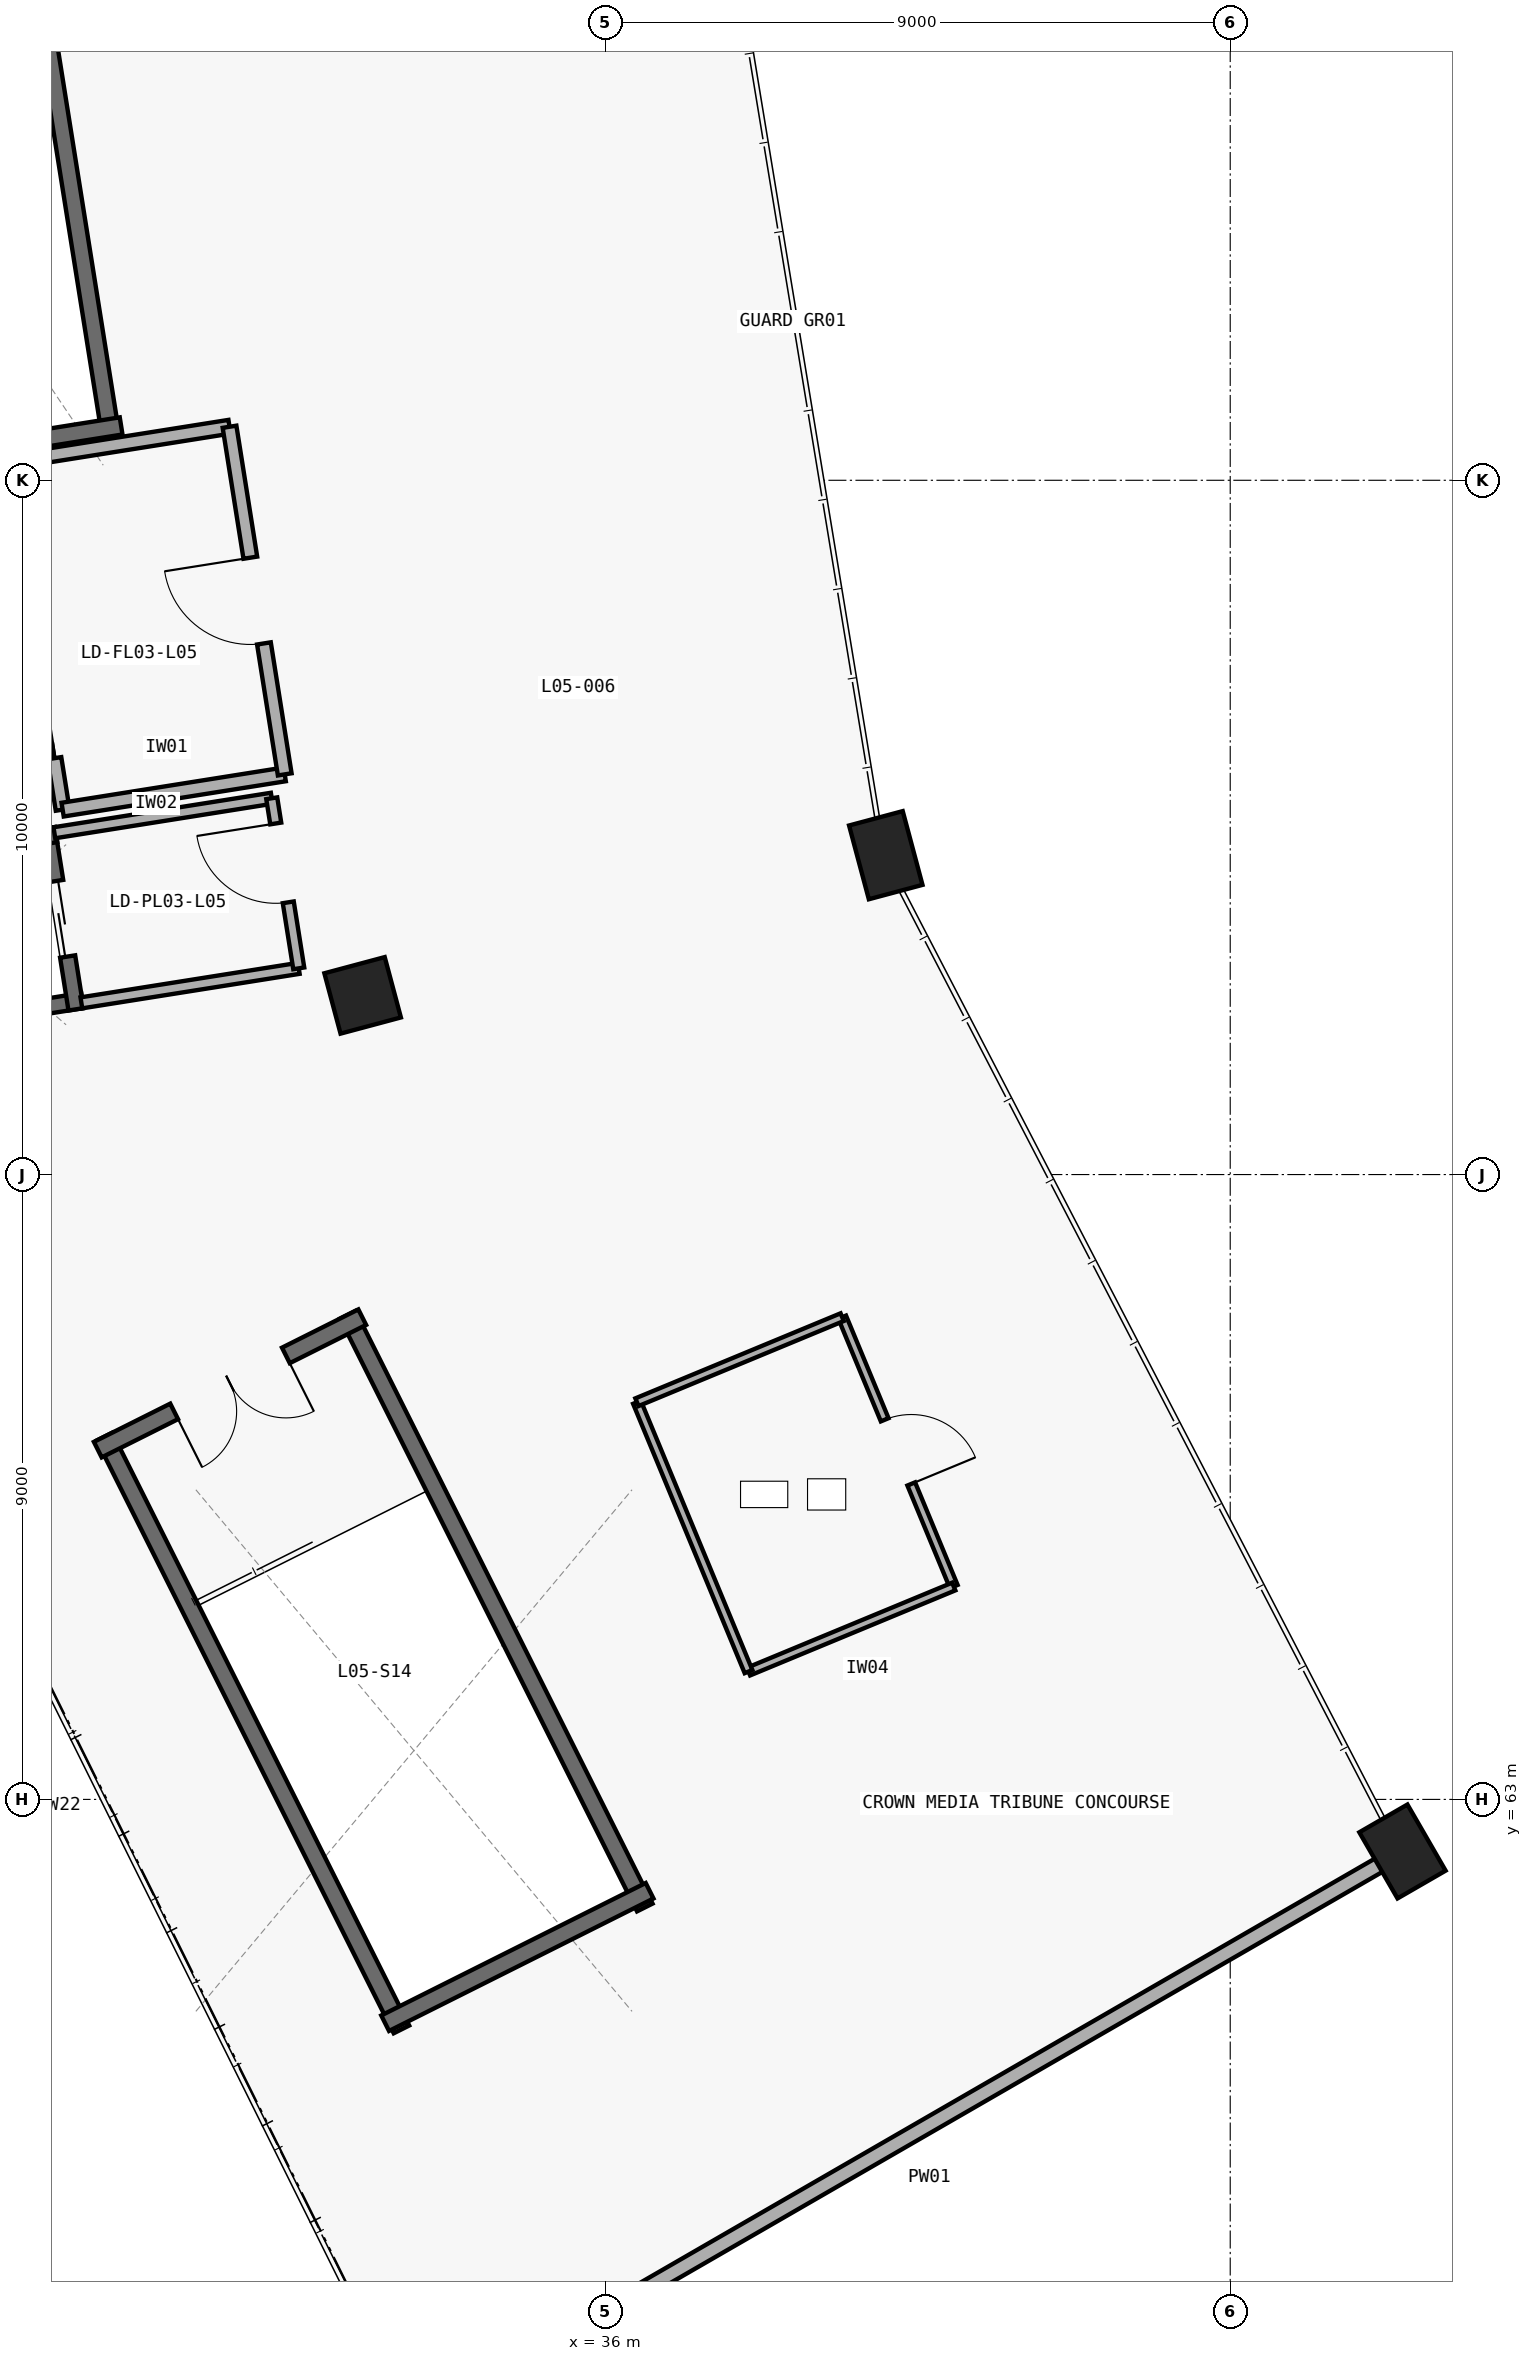
"""IFC4 building model, lengths in metres.
Left out: names, types, materials, properties, quantities, classifications, styles, units other than length and angle.
Written with IfcOpenShell. Run it as: python <this file> out.ifc"""

import sys

from ifc_helpers import new_model, si_unit, direction, frame, frame_2d, origin, origin_2d, place, context, subcontext, project, spatial, rectangle, extrude, element, fill, save


model = new_model("IFC4")
c1 = context("Model", 3, precision=1e-05, world=origin(), true_north=direction((0.0, 1.0)))
c2 = subcontext(c1, "Body", "Model", "MODEL_VIEW")
j1 = project(units=[si_unit("LENGTHUNIT", "METRE"), si_unit("PLANEANGLEUNIT", "RADIAN")], contexts=[c1])
p1 = place(None, origin())
s1 = spatial("IfcSite", under=j1, at=p1, CompositionType="ELEMENT")
p2 = place(p1, origin())
s2 = spatial("IfcBuilding", under=s1, at=p2, CompositionType="ELEMENT")
p3 = place(p2, frame((0.0, 0.0, 24.6)))
s3 = spatial("IfcBuildingStorey", under=s2, at=p3, CompositionType="ELEMENT", Elevation=24.6)
p4 = place(p3, frame((40.039, 76.6, 0.0), z_axis=(0.0, 0.0, 1.0), x_axis=(0.965925826289, 0.258819045103, 0.0)))
e1 = element("IfcColumn", 1, at=p4, inside=s3, PredefinedType="COLUMN", context=c2, shape_type="SweptSolid", body=[
    extrude(rectangle(XDim=0.8, YDim=1.1, at=origin_2d()), origin(), (0.0, 0.0, 1.0), 4.8),
])
p5 = place(p3, frame((32.504, 74.581, 0.0), z_axis=(0.0, 0.0, 1.0), x_axis=(0.965925826289, 0.258819045103, 0.0)))
e2 = element("IfcColumn", 2, at=p5, inside=s3, PredefinedType="COLUMN", context=c2, shape_type="SweptSolid", body=[
    extrude(rectangle(XDim=0.9, YDim=0.9, at=origin_2d()), origin(), (0.0, 0.0, 1.0), 4.8),
])
p6 = place(p3, frame((47.481, 62.25, 0.0), z_axis=(0.0, 0.0, 1.0), x_axis=(0.866025403784, 0.5, 0.0)))
e3 = element("IfcColumn", 3, at=p6, inside=s3, PredefinedType="COLUMN", context=c2, shape_type="SweptSolid", body=[
    extrude(rectangle(XDim=0.8, YDim=1.1, at=origin_2d()), origin(), (0.0, 0.0, 1.0), 4.8),
])
p7 = place(p3, frame((47.481, 62.25, 0.0), z_axis=(0.0, 0.0, 1.0), x_axis=(-0.866019999656, -0.500009360108, 0.0)))
e4 = element("IfcWall", 4, at=p7, inside=s3, PredefinedType="PARAPET", context=c2, shape_type="SweptSolid", body=[
    extrude(rectangle(XDim=16.5, YDim=0.22, at=frame_2d((8.25, 0.0))), origin(), (0.0, 0.0, 1.0), 3.89),
])
p8 = place(p3, frame((28.887, 82.573, 0.0), z_axis=(0.0, 0.0, 1.0), x_axis=(-0.157243678356, 0.987559833943, 0.0)))
e5 = element("IfcWall", 5, at=p8, inside=s3, PredefinedType="SHEAR", context=c2, shape_type="SweptSolid", body=[
    extrude(rectangle(XDim=9.55, YDim=0.25, at=frame_2d((4.775, 0.0))), origin(), (0.0, 0.0, 1.0), 4.62),
])
p9 = place(p3, frame((24.819, 82.113, 0.0), z_axis=(0.0, 0.0, 1.0), x_axis=(0.987557660991, 0.157257324847, 0.0)))
e6 = element("IfcWall", 6, at=p9, inside=s3, PredefinedType="SHEAR", context=c2, shape_type="SweptSolid", body=[
    extrude(rectangle(XDim=4.26, YDim=0.25, at=frame_2d((2.13, 0.0))), origin(), (0.0, 0.0, 1.0), 4.62),
])
for number, where, z_axis, x_axis in (
    (7, (28.785, 68.226, 0.0), (0.0, 0.0, 1.0), (0.448, -0.894, 0.0)),
    (8, (36.568, 61.443, 0.0), (0.0, 0.0, 1.0), (-0.448, 0.894, 0.0)),
):
    element("IfcWall", number, at=place(p3, frame(where, z_axis=z_axis, x_axis=x_axis)), inside=s3, PredefinedType="SHEAR", context=c2, shape_type="SweptSolid", body=[
        extrude(rectangle(XDim=9.55, YDim=0.25, at=frame_2d((4.775, 0.0))), origin(), (0.0, 0.0, 1.0), 4.62),
    ])
p10 = place(p3, frame((32.498, 69.946, 0.0), z_axis=(0.0, 0.0, 1.0), x_axis=(-0.89409454548, -0.447878268888, 0.0)))
e9 = element("IfcWall", 9, at=p10, inside=s3, PredefinedType="SHEAR", context=c2, shape_type="SweptSolid", body=[
    extrude(rectangle(XDim=4.26, YDim=0.25, at=frame_2d((2.13, 0.0))), origin(), (0.0, 0.0, 1.0), 4.62),
])
p11 = place(p10, frame((1.23, 0.0, 0.0)))
e10 = element("IfcOpeningElement", 10, at=p11, cuts=e9, PredefinedType="OPENING", context=c2, shape_type="SweptSolid", body=[
    extrude(rectangle(XDim=1.8, YDim=2.25, at=frame_2d((0.9, 1.125))), frame((0.0, 0.135, 0.0), z_axis=(0.0, -1.0, 0.0), x_axis=(1.0, 0.0, 0.0)), (0.0, 0.0, 1.0), 0.27),
])
p12 = place(p3, frame((32.828, 59.777, 0.0), z_axis=(0.0, 0.0, 1.0), x_axis=(0.89409454548, 0.447878268888, 0.0)))
e11 = element("IfcWall", 11, at=p12, inside=s3, PredefinedType="SHEAR", context=c2, shape_type="SweptSolid", body=[
    extrude(rectangle(XDim=4.26, YDim=0.25, at=frame_2d((2.13, 0.0))), origin(), (0.0, 0.0, 1.0), 4.62),
])
p13 = place(p3, frame((24.653, 77.547, 0.0), z_axis=(0.0, 0.0, 1.0), x_axis=(0.987703627881, 0.156337914372, 0.0)))
e12 = element("IfcWall", 12, at=p13, inside=s3, PredefinedType="SHEAR", context=c2, shape_type="SweptSolid", body=[
    extrude(rectangle(XDim=3.44, YDim=0.22, at=frame_2d((1.72, 0.0))), origin(), (0.0, 0.0, 1.0), 4.62),
])
p14 = place(p3, frame((27.959, 77.959, 0.0), z_axis=(0.0, 0.0, 1.0), x_axis=(-0.156807626334, 0.987629165387, 0.0)))
e13 = element("IfcWall", 13, at=p14, inside=s3, PredefinedType="SHEAR", context=c2, shape_type="SweptSolid", body=[
    extrude(rectangle(XDim=2.641, YDim=0.22, at=frame_2d((1.32, 0.0))), origin(), (0.0, 0.0, 1.0), 4.62),
])
p15 = place(p14, frame((0.62, 0.0, 0.0)))
e14 = element("IfcOpeningElement", 14, at=p15, cuts=e13, PredefinedType="OPENING", context=c2, shape_type="SweptSolid", body=[
    extrude(rectangle(XDim=1.4, YDim=2.2, at=frame_2d((0.7, 1.1))), frame((0.0, 0.12, 0.0), z_axis=(0.0, -1.0, 0.0), x_axis=(1.0, 0.0, 0.0)), (0.0, 0.0, 1.0), 0.24),
])
p16 = place(p3, frame((28.183, 77.256, 0.0), z_axis=(0.0, 0.0, 1.0), x_axis=(-0.157482870509, 0.987521719, 0.0)))
e15 = element("IfcWall", 15, at=p16, inside=s3, PredefinedType="PARTITIONING", context=c2, shape_type="SweptSolid", body=[
    extrude(rectangle(XDim=0.75, YDim=0.2, at=frame_2d((0.375, 0.0))), origin(), (0.0, 0.0, 1.0), 4.6),
])
p17 = place(p3, frame((28.183, 77.256, 0.0), z_axis=(0.0, 0.0, 1.0), x_axis=(0.987633675984, 0.156779214382, 0.0)))
e16 = element("IfcWall", 16, at=p17, inside=s3, PredefinedType="PARTITIONING", context=c2, shape_type="SweptSolid", body=[
    extrude(rectangle(XDim=3.239, YDim=0.2, at=frame_2d((1.62, 0.0))), origin(), (0.0, 0.0, 1.0), 4.6),
])
p18 = place(p3, frame((27.387, 82.263, 0.0), z_axis=(0.0, 0.0, 1.0), x_axis=(0.987629416648, 0.156806043797, 0.0)))
e17 = element("IfcWall", 17, at=p18, inside=s3, PredefinedType="PARTITIONING", context=c2, shape_type="SweptSolid", body=[
    extrude(rectangle(XDim=3.24, YDim=0.2, at=frame_2d((1.62, 0.0))), origin(), (0.0, 0.0, 1.0), 4.6),
])
p19 = place(p3, frame((31.382, 77.764, 0.0), z_axis=(0.0, 0.0, 1.0), x_axis=(-0.156842848291, 0.987623572491, 0.0)))
e18 = element("IfcWall", 18, at=p19, inside=s3, PredefinedType="PARTITIONING", context=c2, shape_type="SweptSolid", body=[
    extrude(rectangle(XDim=5.07, YDim=0.2, at=frame_2d((2.535, 0.0))), origin(), (0.0, 0.0, 1.0), 4.6),
])
p20 = place(p19, frame((1.91, 0.0, 0.0)))
e19 = element("IfcOpeningElement", 19, at=p20, cuts=e18, PredefinedType="OPENING", context=c2, shape_type="SweptSolid", body=[
    extrude(rectangle(XDim=1.25, YDim=2.2, at=frame_2d((0.625, 1.1))), frame((0.0, 0.11, 0.0), z_axis=(0.0, -1.0, 0.0), x_axis=(1.0, 0.0, 0.0)), (0.0, 0.0, 1.0), 0.22),
])
p21 = place(p3, frame((25.366, 74.014, 0.0), z_axis=(0.0, 0.0, 1.0), x_axis=(0.987645460109, 0.156704962032, 0.0)))
e20 = element("IfcWall", 20, at=p21, inside=s3, PredefinedType="SHEAR", context=c2, shape_type="SweptSolid", body=[
    extrude(rectangle(XDim=3.141, YDim=0.22, at=frame_2d((1.57, 0.0))), origin(), (0.0, 0.0, 1.0), 4.62),
])
p22 = place(p3, frame((28.376, 74.38, 0.0), z_axis=(0.0, 0.0, 1.0), x_axis=(-0.156793308963, 0.987631438475, 0.0)))
e21 = element("IfcWall", 21, at=p22, inside=s3, PredefinedType="SHEAR", context=c2, shape_type="SweptSolid", body=[
    extrude(rectangle(XDim=2.641, YDim=0.22, at=frame_2d((1.32, 0.0))), origin(), (0.0, 0.0, 1.0), 4.62),
])
p23 = place(p22, frame((0.77, 0.0, 0.0)))
e22 = element("IfcOpeningElement", 22, at=p23, cuts=e21, PredefinedType="OPENING", context=c2, shape_type="SweptSolid", body=[
    extrude(rectangle(XDim=1.1, YDim=2.15, at=frame_2d((0.55, 1.075))), frame((0.0, 0.12, 0.0), z_axis=(0.0, -1.0, 0.0), x_axis=(1.0, 0.0, 0.0)), (0.0, 0.0, 1.0), 0.24),
])
p24 = place(p3, frame((28.088, 76.896, 0.0), z_axis=(0.0, 0.0, 1.0), x_axis=(-0.98765558045, -0.156641164471, 0.0)))
e23 = element("IfcWall", 23, at=p24, inside=s3, PredefinedType="SHEAR", context=c2, shape_type="SweptSolid", body=[
    extrude(rectangle(XDim=3.141, YDim=0.22, at=frame_2d((1.57, 0.0))), origin(), (0.0, 0.0, 1.0), 4.62),
])
p25 = place(p3, frame((28.453, 74.473, 0.0), z_axis=(0.0, 0.0, 1.0), x_axis=(0.987632121619, 0.156789005818, 0.0)))
e24 = element("IfcWall", 24, at=p25, inside=s3, PredefinedType="PARTITIONING", context=c2, shape_type="SweptSolid", body=[
    extrude(rectangle(XDim=3.17, YDim=0.16, at=frame_2d((1.585, 0.0))), origin(), (0.0, 0.0, 1.0), 4.6),
])
p26 = place(p3, frame((28.064, 76.923, 0.0), z_axis=(0.0, 0.0, 1.0), x_axis=(0.987644043639, 0.156713889186, 0.0)))
e25 = element("IfcWall", 25, at=p26, inside=s3, PredefinedType="PARTITIONING", context=c2, shape_type="SweptSolid", body=[
    extrude(rectangle(XDim=3.17, YDim=0.16, at=frame_2d((1.585, 0.0))), origin(), (0.0, 0.0, 1.0), 4.6),
])
p27 = place(p3, frame((31.584, 74.97, 0.0), z_axis=(0.0, 0.0, 1.0), x_axis=(-0.156781258489, 0.987633351496, 0.0)))
e26 = element("IfcWall", 26, at=p27, inside=s3, PredefinedType="PARTITIONING", context=c2, shape_type="SweptSolid", body=[
    extrude(rectangle(XDim=2.481, YDim=0.16, at=frame_2d((1.24, 0.0))), origin(), (0.0, 0.0, 1.0), 4.6),
])
p28 = place(p27, frame((0.963, 0.0, 0.0)))
e27 = element("IfcOpeningElement", 27, at=p28, cuts=e26, PredefinedType="OPENING", context=c2, shape_type="SweptSolid", body=[
    extrude(rectangle(XDim=1.15, YDim=2.2, at=frame_2d((0.575, 1.1))), frame((0.0, 0.09, 0.0), z_axis=(0.0, -1.0, 0.0), x_axis=(1.0, 0.0, 0.0)), (0.0, 0.0, 1.0), 0.18),
])
p29 = place(p3, frame((39.411, 69.946, 0.0), z_axis=(0.0, 0.0, 1.0), x_axis=(0.382678661728, -0.923881508559, 0.0)))
e28 = element("IfcWall", 28, at=p29, inside=s3, PredefinedType="PARTITIONING", context=c2, shape_type="SweptSolid", body=[
    extrude(rectangle(XDim=4.2, YDim=0.12, at=frame_2d((2.1, 0.0))), origin(), (0.0, 0.0, 1.0), 4.6),
])
p30 = place(p29, frame((1.6, 0.0, 0.0)))
e29 = element("IfcOpeningElement", 29, at=p30, cuts=e28, PredefinedType="OPENING", context=c2, shape_type="SweptSolid", body=[
    extrude(rectangle(XDim=1.0, YDim=2.1, at=frame_2d((0.5, 1.05))), frame((0.0, 0.07, 0.0), z_axis=(0.0, -1.0, 0.0), x_axis=(1.0, 0.0, 0.0)), (0.0, 0.0, 1.0), 0.14),
])
p31 = place(p3, frame((41.018, 66.066, 0.0), z_axis=(0.0, 0.0, 1.0), x_axis=(-0.923833607797, -0.382794285622, 0.0)))
e30 = element("IfcWall", 30, at=p31, inside=s3, PredefinedType="PARTITIONING", context=c2, shape_type="SweptSolid", body=[
    extrude(rectangle(XDim=3.2, YDim=0.12, at=frame_2d((1.6, 0.0))), origin(), (0.0, 0.0, 1.0), 4.6),
])
p32 = place(p3, frame((38.062, 64.841, 0.0), z_axis=(0.0, 0.0, 1.0), x_axis=(-0.382649593233, 0.923893548413, 0.0)))
e31 = element("IfcWall", 31, at=p32, inside=s3, PredefinedType="PARTITIONING", context=c2, shape_type="SweptSolid", body=[
    extrude(rectangle(XDim=4.199, YDim=0.12, at=frame_2d((2.1, 0.0))), origin(), (0.0, 0.0, 1.0), 4.6),
])
p33 = place(p3, frame((36.455, 68.721, 0.0), z_axis=(0.0, 0.0, 1.0), x_axis=(0.923795438963, 0.38288638909, 0.0)))
e32 = element("IfcWall", 32, at=p33, inside=s3, PredefinedType="PARTITIONING", context=c2, shape_type="SweptSolid", body=[
    extrude(rectangle(XDim=3.2, YDim=0.12, at=frame_2d((1.6, 0.0))), origin(), (0.0, 0.0, 1.0), 4.6),
])
p34 = place(p11, origin())
e33 = element("IfcDoor", 33, at=p34, inside=s3, OperationType="DOUBLE_DOOR_SINGLE_SWING", PredefinedType="DOOR", context=c2, shape_type="SweptSolid", body=[
    extrude(rectangle(XDim=1.8, YDim=2.25, at=frame_2d((0.9, 1.125))), frame((0.0, 0.025, 0.0), z_axis=(0.0, -1.0, 0.0), x_axis=(1.0, 0.0, 0.0)), (0.0, 0.0, 1.0), 0.05),
])
fill(e10, e33)
p35 = place(p20, origin())
e34 = element("IfcDoor", 34, at=p35, inside=s3, OperationType="SINGLE_SWING_RIGHT", PredefinedType="DOOR", context=c2, shape_type="SweptSolid", body=[
    extrude(rectangle(XDim=1.25, YDim=2.2, at=frame_2d((0.625, 1.1))), frame((0.0, 0.025, 0.0), z_axis=(0.0, -1.0, 0.0), x_axis=(1.0, 0.0, 0.0)), (0.0, 0.0, 1.0), 0.05),
])
fill(e19, e34)
p36 = place(p23, origin())
e35 = element("IfcDoor", 35, at=p36, inside=s3, OperationType="SLIDING_TO_LEFT", PredefinedType="DOOR", context=c2, shape_type="SweptSolid", body=[
    extrude(rectangle(XDim=1.1, YDim=2.15, at=frame_2d((0.55, 1.075))), frame((0.0, 0.025, 0.0), z_axis=(0.0, -1.0, 0.0), x_axis=(1.0, 0.0, 0.0)), (0.0, 0.0, 1.0), 0.05),
])
fill(e22, e35)
p37 = place(p28, origin())
e36 = element("IfcDoor", 36, at=p37, inside=s3, OperationType="SINGLE_SWING_RIGHT", PredefinedType="DOOR", context=c2, shape_type="SweptSolid", body=[
    extrude(rectangle(XDim=1.15, YDim=2.2, at=frame_2d((0.575, 1.1))), frame((0.0, 0.025, 0.0), z_axis=(0.0, -1.0, 0.0), x_axis=(1.0, 0.0, 0.0)), (0.0, 0.0, 1.0), 0.05),
])
fill(e27, e36)
p38 = place(p30, origin())
e37 = element("IfcDoor", 37, at=p38, inside=s3, OperationType="SINGLE_SWING_RIGHT", PredefinedType="DOOR", context=c2, shape_type="SweptSolid", body=[
    extrude(rectangle(XDim=1.0, YDim=2.1, at=frame_2d((0.5, 1.05))), frame((0.0, 0.025, 0.0), z_axis=(0.0, -1.0, 0.0), x_axis=(1.0, 0.0, 0.0)), (0.0, 0.0, 1.0), 0.05),
])
fill(e29, e37)
save(model, sys.argv[1])
